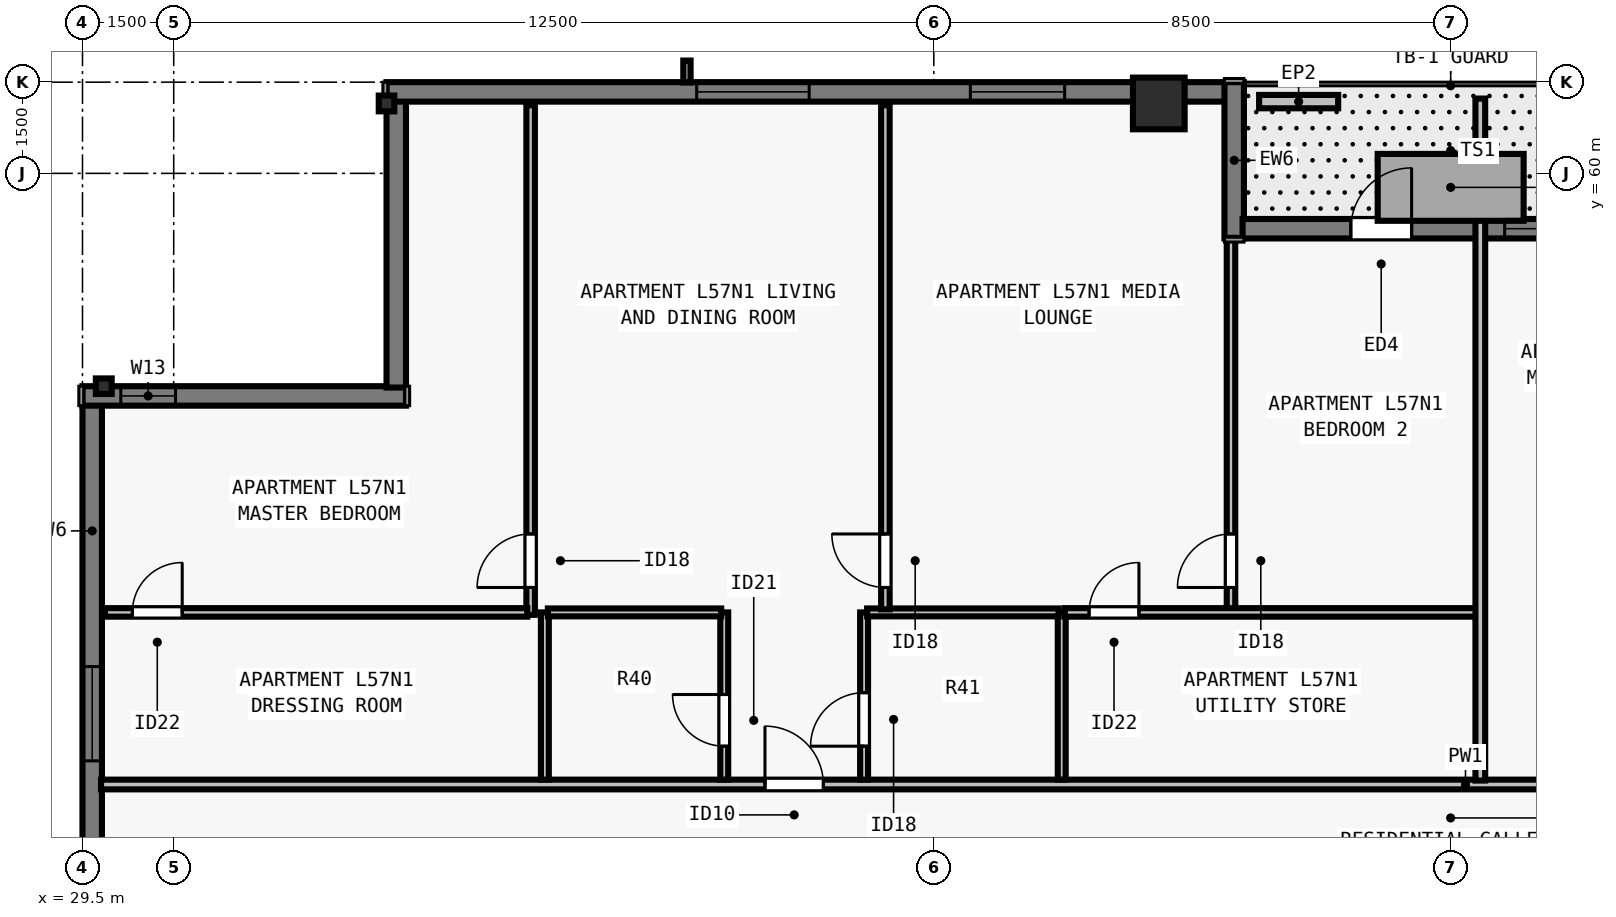
"""IFC4 building model, lengths in metres.
Left out: names, types, materials, properties, quantities, classifications, styles, units other than length and angle.
Written with IfcOpenShell. Run it as: python <this file> out.ifc"""

import sys

from ifc_helpers import new_model, si_unit, direction, frame, frame_2d, origin, origin_2d, place, context, subcontext, project, spatial, rectangle, i_section, extrude, element, fill, save


model = new_model("IFC4")
c1 = context("Model", 3, precision=1e-05, world=origin(), true_north=direction((0.0, 1.0)))
c2 = subcontext(c1, "Body", "Model", "MODEL_VIEW")
j1 = project(units=[si_unit("LENGTHUNIT", "METRE"), si_unit("PLANEANGLEUNIT", "RADIAN")], contexts=[c1])
p1 = place(None, origin())
s1 = spatial("IfcSite", under=j1, at=p1, CompositionType="ELEMENT")
p2 = place(p1, origin())
s2 = spatial("IfcBuilding", under=s1, at=p2, CompositionType="ELEMENT")
p3 = place(p2, frame((0.0, 0.0, 209.5)))
s3 = spatial("IfcBuildingStorey", under=s2, at=p3, CompositionType="ELEMENT", Elevation=209.5)
p4 = place(p3, frame((47.2, 61.15, 0.0), z_axis=(0.0, 0.0, 1.0), x_axis=(1.0, 0.0, 0.0)))
e1 = element("IfcColumn", 1, at=p4, inside=s3, PredefinedType="COLUMN", context=c2, shape_type="SweptSolid", body=[
    extrude(rectangle(XDim=0.85, YDim=0.85, at=origin_2d()), origin(), (0.0, 0.0, 1.0), 3.5),
])
for number, where, z_axis, x_axis in (
    (2, (34.5, 61.15, 0.0), (0.0, 0.0, 1.0), (1.0, 0.0, 0.0)),
    (3, (29.85, 56.5, 0.0), (0.0, 0.0, 1.0), (0.0, 1.0, 0.0)),
):
    element("IfcColumn", number, at=place(p3, frame(where, z_axis=z_axis, x_axis=x_axis)), inside=s3, PredefinedType="COLUMN", context=c2, shape_type="SweptSolid", body=[
        extrude(i_section(OverallWidth=0.256, OverallDepth=0.26, WebThickness=0.01, FlangeThickness=0.017, FilletRadius=0.013, at=origin_2d()), origin(), (0.0, 0.0, 1.0), 3.5),
    ])
p5 = place(p3, frame((29.66, 21.5, 0.0), z_axis=(0.0, 0.0, 1.0), x_axis=(0.0, 1.0, 0.0)))
e4 = element("IfcWall", 4, at=p5, inside=s3, PredefinedType="SOLIDWALL", context=c2, shape_type="SweptSolid", body=[
    extrude(rectangle(XDim=34.702, YDim=0.32, at=frame_2d((17.351, 0.0))), origin(), (0.0, 0.0, 1.0), 3.29),
])
p6 = place(p5, frame((4.163, 0.0, 0.8)))
e5 = element("IfcOpeningElement", 5, at=p6, cuts=e4, PredefinedType="OPENING", context=c2, shape_type="SweptSolid", body=[
    extrude(rectangle(XDim=1.85, YDim=1.678, at=frame_2d((0.925, 0.839))), frame((0.0, 0.17, 0.0), z_axis=(0.0, -1.0, 0.0), x_axis=(1.0, 0.0, 0.0)), (0.0, 0.0, 1.0), 0.34),
])
p7 = place(p5, frame((6.888, 0.0, 0.8)))
e6 = element("IfcOpeningElement", 6, at=p7, cuts=e4, PredefinedType="OPENING", context=c2, shape_type="SweptSolid", body=[
    extrude(rectangle(XDim=1.55, YDim=1.678, at=frame_2d((0.775, 0.839))), frame((0.0, 0.17, 0.0), z_axis=(0.0, -1.0, 0.0), x_axis=(1.0, 0.0, 0.0)), (0.0, 0.0, 1.0), 0.34),
])
p8 = place(p5, frame((10.113, 0.0, 0.8)))
e7 = element("IfcOpeningElement", 7, at=p8, cuts=e4, PredefinedType="OPENING", context=c2, shape_type="SweptSolid", body=[
    extrude(rectangle(XDim=1.85, YDim=1.678, at=frame_2d((0.925, 0.839))), frame((0.0, 0.17, 0.0), z_axis=(0.0, -1.0, 0.0), x_axis=(1.0, 0.0, 0.0)), (0.0, 0.0, 1.0), 0.34),
])
p9 = place(p5, frame((14.888, 0.0, 0.8)))
e8 = element("IfcOpeningElement", 8, at=p9, cuts=e4, PredefinedType="OPENING", context=c2, shape_type="SweptSolid", body=[
    extrude(rectangle(XDim=1.55, YDim=1.678, at=frame_2d((0.775, 0.839))), frame((0.0, 0.17, 0.0), z_axis=(0.0, -1.0, 0.0), x_axis=(1.0, 0.0, 0.0)), (0.0, 0.0, 1.0), 0.34),
])
p10 = place(p5, frame((19.364, 0.0, 0.8)))
e9 = element("IfcOpeningElement", 9, at=p10, cuts=e4, PredefinedType="OPENING", context=c2, shape_type="SweptSolid", body=[
    extrude(rectangle(XDim=1.85, YDim=1.678, at=frame_2d((0.925, 0.839))), frame((0.0, 0.17, 0.0), z_axis=(0.0, -1.0, 0.0), x_axis=(1.0, 0.0, 0.0)), (0.0, 0.0, 1.0), 0.34),
])
p11 = place(p5, frame((23.614, 0.0, 0.8)))
e10 = element("IfcOpeningElement", 10, at=p11, cuts=e4, PredefinedType="OPENING", context=c2, shape_type="SweptSolid", body=[
    extrude(rectangle(XDim=1.85, YDim=1.678, at=frame_2d((0.925, 0.839))), frame((0.0, 0.17, 0.0), z_axis=(0.0, -1.0, 0.0), x_axis=(1.0, 0.0, 0.0)), (0.0, 0.0, 1.0), 0.34),
])
p12 = place(p5, frame((28.839, 0.0, 0.8)))
e11 = element("IfcOpeningElement", 11, at=p12, cuts=e4, PredefinedType="OPENING", context=c2, shape_type="SweptSolid", body=[
    extrude(rectangle(XDim=1.55, YDim=1.678, at=frame_2d((0.775, 0.839))), frame((0.0, 0.17, 0.0), z_axis=(0.0, -1.0, 0.0), x_axis=(1.0, 0.0, 0.0)), (0.0, 0.0, 1.0), 0.34),
])
p13 = place(p3, frame((29.5, 56.34, 0.0), z_axis=(0.0, 0.0, 1.0), x_axis=(1.0, 0.0, 0.0)))
e12 = element("IfcWall", 12, at=p13, inside=s3, PredefinedType="SOLIDWALL", context=c2, shape_type="SweptSolid", body=[
    extrude(rectangle(XDim=5.32, YDim=0.32, at=frame_2d((2.66, 0.0))), origin(), (0.0, 0.0, 1.0), 3.29),
])
p14 = place(p13, frame((0.63, 0.0, 0.8)))
e13 = element("IfcOpeningElement", 13, at=p14, cuts=e12, PredefinedType="OPENING", context=c2, shape_type="SweptSolid", body=[
    extrude(rectangle(XDim=0.9, YDim=1.678, at=frame_2d((0.45, 0.839))), frame((0.0, 0.17, 0.0), z_axis=(0.0, -1.0, 0.0), x_axis=(1.0, 0.0, 0.0)), (0.0, 0.0, 1.0), 0.34),
])
p15 = place(p3, frame((34.66, 56.478, 0.0), z_axis=(0.0, 0.0, 1.0), x_axis=(0.0, 1.0, 0.0)))
e14 = element("IfcWall", 14, at=p15, inside=s3, PredefinedType="SOLIDWALL", context=c2, shape_type="SweptSolid", body=[
    extrude(rectangle(XDim=4.724, YDim=0.32, at=frame_2d((2.362, 0.0))), origin(), (0.0, 0.0, 1.0), 3.29),
])
p16 = place(p3, frame((34.5, 61.34, 0.0), z_axis=(0.0, 0.0, 1.0), x_axis=(1.0, 0.0, 0.0)))
e15 = element("IfcWall", 15, at=p16, inside=s3, PredefinedType="SOLIDWALL", context=c2, shape_type="SweptSolid", body=[
    extrude(rectangle(XDim=13.802, YDim=0.32, at=frame_2d((6.901, 0.0))), origin(), (0.0, 0.0, 1.0), 3.29),
])
p17 = place(p16, frame((5.101, 0.0, 0.8)))
e16 = element("IfcOpeningElement", 16, at=p17, cuts=e15, PredefinedType="OPENING", context=c2, shape_type="SweptSolid", body=[
    extrude(rectangle(XDim=1.85, YDim=1.678, at=frame_2d((0.925, 0.839))), frame((0.0, 0.17, 0.0), z_axis=(0.0, -1.0, 0.0), x_axis=(1.0, 0.0, 0.0)), (0.0, 0.0, 1.0), 0.34),
])
p18 = place(p16, frame((9.602, 0.0, 0.8)))
e17 = element("IfcOpeningElement", 17, at=p18, cuts=e15, PredefinedType="OPENING", context=c2, shape_type="SweptSolid", body=[
    extrude(rectangle(XDim=1.55, YDim=1.678, at=frame_2d((0.775, 0.839))), frame((0.0, 0.17, 0.0), z_axis=(0.0, -1.0, 0.0), x_axis=(1.0, 0.0, 0.0)), (0.0, 0.0, 1.0), 0.34),
])
p19 = place(p3, frame((48.44, 61.5, 0.0), z_axis=(0.0, 0.0, 1.0), x_axis=(0.0, -1.0, 0.0)))
e18 = element("IfcWall", 18, at=p19, inside=s3, PredefinedType="SOLIDWALL", context=c2, shape_type="SweptSolid", body=[
    extrude(rectangle(XDim=2.57, YDim=0.32, at=frame_2d((1.285, 0.0))), origin(), (0.0, 0.0, 1.0), 3.29),
])
p20 = place(p3, frame((48.578, 59.09, 0.0), z_axis=(0.0, 0.0, 1.0), x_axis=(1.0, 0.0, 0.0)))
e19 = element("IfcWall", 19, at=p20, inside=s3, PredefinedType="SOLIDWALL", context=c2, shape_type="SweptSolid", body=[
    extrude(rectangle(XDim=7.142, YDim=0.32, at=frame_2d((3.571, 0.0))), origin(), (0.0, 0.0, 1.0), 3.29),
])
p21 = place(p20, frame((1.78, 0.0, 0.0)))
e20 = element("IfcOpeningElement", 20, at=p21, cuts=e19, PredefinedType="OPENING", context=c2, shape_type="SweptSolid", body=[
    extrude(rectangle(XDim=1.0, YDim=2.15, at=frame_2d((0.5, 1.075))), frame((0.0, 0.17, 0.0), z_axis=(0.0, -1.0, 0.0), x_axis=(1.0, 0.0, 0.0)), (0.0, 0.0, 1.0), 0.34),
])
p22 = place(p20, frame((4.31, 0.0, 0.8)))
e21 = element("IfcOpeningElement", 21, at=p22, cuts=e19, PredefinedType="OPENING", context=c2, shape_type="SweptSolid", body=[
    extrude(rectangle(XDim=0.9, YDim=1.678, at=frame_2d((0.45, 0.839))), frame((0.0, 0.17, 0.0), z_axis=(0.0, -1.0, 0.0), x_axis=(1.0, 0.0, 0.0)), (0.0, 0.0, 1.0), 0.34),
])
p23 = place(p3, frame((48.85, 61.18, 0.0), z_axis=(0.0, 0.0, 1.0), x_axis=(1.0, 0.0, 0.0)))
e22 = element("IfcWall", 22, at=p23, inside=s3, PredefinedType="PARAPET", context=c2, shape_type="SweptSolid", body=[
    extrude(rectangle(XDim=1.3, YDim=0.22, at=frame_2d((0.65, 0.0))), origin(), (0.0, 0.0, 1.0), 0.55),
])
p24 = place(p3, frame((29.805, 49.95, 0.0), z_axis=(0.0, 0.0, 1.0), x_axis=(1.0, 0.0, 0.0)))
e23 = element("IfcWall", 23, at=p24, inside=s3, PredefinedType="PARTITIONING", context=c2, shape_type="SweptSolid", body=[
    extrude(rectangle(XDim=44.39, YDim=0.16, at=frame_2d((22.195, 0.0))), origin(), (0.0, 0.0, 1.0), 2.958),
])
p25 = place(p24, frame((10.919, 0.0, 0.0)))
e24 = element("IfcOpeningElement", 24, at=p25, cuts=e23, PredefinedType="OPENING", context=c2, shape_type="SweptSolid", body=[
    extrude(rectangle(XDim=0.96, YDim=2.18, at=frame_2d((0.48, 1.09))), frame((0.0, 0.09, 0.0), z_axis=(0.0, -1.0, 0.0), x_axis=(1.0, 0.0, 0.0)), (0.0, 0.0, 1.0), 0.18),
])
p26 = place(p24, frame((32.999, 0.0, 0.0)))
e25 = element("IfcOpeningElement", 25, at=p26, cuts=e23, PredefinedType="OPENING", context=c2, shape_type="SweptSolid", body=[
    extrude(rectangle(XDim=0.96, YDim=2.18, at=frame_2d((0.48, 1.09))), frame((0.0, 0.09, 0.0), z_axis=(0.0, -1.0, 0.0), x_axis=(1.0, 0.0, 0.0)), (0.0, 0.0, 1.0), 0.18),
])
p27 = place(p3, frame((37.104, 50.03, 0.0), z_axis=(0.0, 0.0, 1.0), x_axis=(0.0, 1.0, 0.0)))
e26 = element("IfcWall", 26, at=p27, inside=s3, PredefinedType="PLUMBINGWALL", context=c2, shape_type="SweptSolid", body=[
    extrude(rectangle(XDim=2.75, YDim=0.13, at=frame_2d((1.375, 0.0))), origin(), (0.0, 0.0, 1.0), 3.29),
])
p28 = place(p3, frame((40.054, 50.03, 0.0), z_axis=(0.0, 0.0, 1.0), x_axis=(0.0, 1.0, 0.0)))
e27 = element("IfcWall", 27, at=p28, inside=s3, PredefinedType="PLUMBINGWALL", context=c2, shape_type="SweptSolid", body=[
    extrude(rectangle(XDim=2.75, YDim=0.13, at=frame_2d((1.375, 0.0))), origin(), (0.0, 0.0, 1.0), 2.573),
])
p29 = place(p28, frame((0.55, 0.0, 0.0)))
e28 = element("IfcOpeningElement", 28, at=p29, cuts=e27, PredefinedType="OPENING", context=c2, shape_type="SweptSolid", body=[
    extrude(rectangle(XDim=0.85, YDim=2.08, at=frame_2d((0.425, 1.04))), frame((0.0, 0.075, 0.0), z_axis=(0.0, -1.0, 0.0), x_axis=(1.0, 0.0, 0.0)), (0.0, 0.0, 1.0), 0.15),
])
p30 = place(p3, frame((37.154, 52.78, 0.0), z_axis=(0.0, 0.0, 1.0), x_axis=(1.0, 0.0, 0.0)))
e29 = element("IfcWall", 29, at=p30, inside=s3, PredefinedType="PLUMBINGWALL", context=c2, shape_type="SweptSolid", body=[
    extrude(rectangle(XDim=2.85, YDim=0.13, at=frame_2d((1.425, 0.0))), origin(), (0.0, 0.0, 1.0), 3.29),
])
p31 = place(p3, frame((45.604, 50.03, 0.0), z_axis=(0.0, 0.0, 1.0), x_axis=(0.0, 1.0, 0.0)))
e30 = element("IfcWall", 30, at=p31, inside=s3, PredefinedType="PLUMBINGWALL", context=c2, shape_type="SweptSolid", body=[
    extrude(rectangle(XDim=2.75, YDim=0.13, at=frame_2d((1.375, 0.0))), origin(), (0.0, 0.0, 1.0), 3.29),
])
p32 = place(p3, frame((42.354, 50.03, 0.0), z_axis=(0.0, 0.0, 1.0), x_axis=(0.0, 1.0, 0.0)))
e31 = element("IfcWall", 31, at=p32, inside=s3, PredefinedType="PLUMBINGWALL", context=c2, shape_type="SweptSolid", body=[
    extrude(rectangle(XDim=2.75, YDim=0.13, at=frame_2d((1.375, 0.0))), origin(), (0.0, 0.0, 1.0), 3.29),
])
p33 = place(p32, frame((0.55, 0.0, 0.0)))
e32 = element("IfcOpeningElement", 32, at=p33, cuts=e31, PredefinedType="OPENING", context=c2, shape_type="SweptSolid", body=[
    extrude(rectangle(XDim=0.88, YDim=2.1, at=frame_2d((0.44, 1.05))), frame((0.0, 0.075, 0.0), z_axis=(0.0, -1.0, 0.0), x_axis=(1.0, 0.0, 0.0)), (0.0, 0.0, 1.0), 0.15),
])
p34 = place(p3, frame((42.404, 52.78, 0.0), z_axis=(0.0, 0.0, 1.0), x_axis=(1.0, 0.0, 0.0)))
e33 = element("IfcWall", 33, at=p34, inside=s3, PredefinedType="PLUMBINGWALL", context=c2, shape_type="SweptSolid", body=[
    extrude(rectangle(XDim=3.15, YDim=0.13, at=frame_2d((1.575, 0.0))), origin(), (0.0, 0.0, 1.0), 3.29),
])
p35 = place(p3, frame((36.87, 52.74, 0.0), z_axis=(0.0, 0.0, 1.0), x_axis=(0.0, 1.0, 0.0)))
e34 = element("IfcWall", 34, at=p35, inside=s3, PredefinedType="PARTITIONING", context=c2, shape_type="SweptSolid", body=[
    extrude(rectangle(XDim=8.38, YDim=0.14, at=frame_2d((4.19, 0.0))), origin(), (0.0, 0.0, 1.0), 2.573),
])
p36 = place(p35, frame((0.45, 0.0, 0.0)))
e35 = element("IfcOpeningElement", 35, at=p36, cuts=e34, PredefinedType="OPENING", context=c2, shape_type="SweptSolid", body=[
    extrude(rectangle(XDim=0.88, YDim=2.1, at=frame_2d((0.44, 1.05))), frame((0.0, 0.08, 0.0), z_axis=(0.0, -1.0, 0.0), x_axis=(1.0, 0.0, 0.0)), (0.0, 0.0, 1.0), 0.16),
])
p37 = place(p3, frame((29.87, 52.78, 0.0), z_axis=(0.0, 0.0, 1.0), x_axis=(1.0, 0.0, 0.0)))
e36 = element("IfcWall", 36, at=p37, inside=s3, PredefinedType="PARTITIONING", context=c2, shape_type="SweptSolid", body=[
    extrude(rectangle(XDim=6.945, YDim=0.14, at=frame_2d((3.472, 0.0))), origin(), (0.0, 0.0, 1.0), 2.958),
])
p38 = place(p37, frame((0.45, 0.0, 0.0)))
e37 = element("IfcOpeningElement", 37, at=p38, cuts=e36, PredefinedType="OPENING", context=c2, shape_type="SweptSolid", body=[
    extrude(rectangle(XDim=0.82, YDim=2.1, at=frame_2d((0.41, 1.05))), frame((0.0, 0.08, 0.0), z_axis=(0.0, -1.0, 0.0), x_axis=(1.0, 0.0, 0.0)), (0.0, 0.0, 1.0), 0.16),
])
p39 = place(p3, frame((48.387, 52.74, 0.0), z_axis=(0.0, 0.0, 1.0), x_axis=(0.0, 1.0, 0.0)))
e38 = element("IfcWall", 38, at=p39, inside=s3, PredefinedType="PARTITIONING", context=c2, shape_type="SweptSolid", body=[
    extrude(rectangle(XDim=6.2, YDim=0.14, at=frame_2d((3.1, 0.0))), origin(), (0.0, 0.0, 1.0), 3.29),
])
p40 = place(p39, frame((0.45, 0.0, 0.0)))
e39 = element("IfcOpeningElement", 39, at=p40, cuts=e38, PredefinedType="OPENING", context=c2, shape_type="SweptSolid", body=[
    extrude(rectangle(XDim=0.88, YDim=2.1, at=frame_2d((0.44, 1.05))), frame((0.0, 0.08, 0.0), z_axis=(0.0, -1.0, 0.0), x_axis=(1.0, 0.0, 0.0)), (0.0, 0.0, 1.0), 0.16),
])
p41 = place(p3, frame((45.654, 52.78, 0.0), z_axis=(0.0, 0.0, 1.0), x_axis=(1.0, 0.0, 0.0)))
e40 = element("IfcWall", 40, at=p41, inside=s3, PredefinedType="PARTITIONING", context=c2, shape_type="SweptSolid", body=[
    extrude(rectangle(XDim=6.884, YDim=0.14, at=frame_2d((3.442, 0.0))), origin(), (0.0, 0.0, 1.0), 3.29),
])
p42 = place(p41, frame((0.4, 0.0, 0.0)))
e41 = element("IfcOpeningElement", 41, at=p42, cuts=e40, PredefinedType="OPENING", context=c2, shape_type="SweptSolid", body=[
    extrude(rectangle(XDim=0.82, YDim=2.1, at=frame_2d((0.41, 1.05))), frame((0.0, 0.08, 0.0), z_axis=(0.0, -1.0, 0.0), x_axis=(1.0, 0.0, 0.0)), (0.0, 0.0, 1.0), 0.16),
])
p43 = place(p3, frame((42.704, 52.83, 0.0), z_axis=(0.0, 0.0, 1.0), x_axis=(0.0, 1.0, 0.0)))
e42 = element("IfcWall", 42, at=p43, inside=s3, PredefinedType="PARTITIONING", context=c2, shape_type="SweptSolid", body=[
    extrude(rectangle(XDim=8.29, YDim=0.14, at=frame_2d((4.145, 0.0))), origin(), (0.0, 0.0, 1.0), 3.29),
])
p44 = place(p43, frame((0.36, 0.0, 0.0)))
e43 = element("IfcOpeningElement", 43, at=p44, cuts=e42, PredefinedType="OPENING", context=c2, shape_type="SweptSolid", body=[
    extrude(rectangle(XDim=0.88, YDim=2.1, at=frame_2d((0.44, 1.05))), frame((0.0, 0.08, 0.0), z_axis=(0.0, -1.0, 0.0), x_axis=(1.0, 0.0, 0.0)), (0.0, 0.0, 1.0), 0.16),
])
p45 = place(p3, frame((52.488, 50.015, 0.0), z_axis=(0.0, 0.0, 1.0), x_axis=(0.0, 1.0, 0.0)))
e44 = element("IfcWall", 44, at=p45, inside=s3, PredefinedType="PARTITIONING", context=c2, shape_type="SweptSolid", body=[
    extrude(rectangle(XDim=11.215, YDim=0.16, at=frame_2d((5.607, 0.0))), origin(), (0.0, 0.0, 1.0), 2.958),
])
p46 = place(p12, origin())
e45 = element("IfcWindow", 45, at=p46, inside=s3, PartitioningType="SINGLE_PANEL", PredefinedType="WINDOW", context=c2, shape_type="SweptSolid", body=[
    extrude(rectangle(XDim=1.55, YDim=1.678, at=frame_2d((0.775, 0.839))), frame((0.0, -0.05, 0.0), z_axis=(0.0, -1.0, 0.0), x_axis=(1.0, 0.0, 0.0)), (0.0, 0.0, 1.0), 0.06),
])
fill(e11, e45)
p47 = place(p17, origin())
e46 = element("IfcWindow", 46, at=p47, inside=s3, PartitioningType="SINGLE_PANEL", PredefinedType="WINDOW", context=c2, shape_type="SweptSolid", body=[
    extrude(rectangle(XDim=1.85, YDim=1.678, at=frame_2d((0.925, 0.839))), frame((0.0, -0.05, 0.0), z_axis=(0.0, -1.0, 0.0), x_axis=(1.0, 0.0, 0.0)), (0.0, 0.0, 1.0), 0.06),
])
fill(e16, e46)
p48 = place(p18, origin())
e47 = element("IfcWindow", 47, at=p48, inside=s3, PartitioningType="SINGLE_PANEL", PredefinedType="WINDOW", context=c2, shape_type="SweptSolid", body=[
    extrude(rectangle(XDim=1.55, YDim=1.678, at=frame_2d((0.775, 0.839))), frame((0.0, -0.05, 0.0), z_axis=(0.0, -1.0, 0.0), x_axis=(1.0, 0.0, 0.0)), (0.0, 0.0, 1.0), 0.06),
])
fill(e17, e47)
p49 = place(p21, origin())
e48 = element("IfcDoor", 48, at=p49, inside=s3, OperationType="SINGLE_SWING_RIGHT", PredefinedType="DOOR", context=c2, shape_type="SweptSolid", body=[
    extrude(rectangle(XDim=1.0, YDim=2.15, at=frame_2d((0.5, 1.075))), frame((0.0, 0.025, 0.0), z_axis=(0.0, -1.0, 0.0), x_axis=(1.0, 0.0, 0.0)), (0.0, 0.0, 1.0), 0.05),
])
fill(e20, e48)
p50 = place(p14, origin())
e49 = element("IfcWindow", 49, at=p50, inside=s3, PartitioningType="SINGLE_PANEL", PredefinedType="WINDOW", context=c2, shape_type="SweptSolid", body=[
    extrude(rectangle(XDim=0.9, YDim=1.678, at=frame_2d((0.45, 0.839))), frame((0.0, -0.04, 0.0), z_axis=(0.0, -1.0, 0.0), x_axis=(1.0, 0.0, 0.0)), (0.0, 0.0, 1.0), 0.06),
])
fill(e13, e49)
p51 = place(p22, origin())
e50 = element("IfcWindow", 50, at=p51, inside=s3, PartitioningType="SINGLE_PANEL", PredefinedType="WINDOW", context=c2, shape_type="SweptSolid", body=[
    extrude(rectangle(XDim=0.9, YDim=1.678, at=frame_2d((0.45, 0.839))), frame((0.0, -0.04, 0.0), z_axis=(0.0, -1.0, 0.0), x_axis=(1.0, 0.0, 0.0)), (0.0, 0.0, 1.0), 0.06),
])
fill(e21, e50)
p52 = place(p29, origin())
e51 = element("IfcDoor", 51, at=p52, inside=s3, OperationType="SINGLE_SWING_RIGHT", PredefinedType="DOOR", context=c2, shape_type="SweptSolid", body=[
    extrude(rectangle(XDim=0.85, YDim=2.08, at=frame_2d((0.425, 1.04))), frame((0.0, 0.025, 0.0), z_axis=(0.0, -1.0, 0.0), x_axis=(1.0, 0.0, 0.0)), (0.0, 0.0, 1.0), 0.05),
])
fill(e28, e51)
p53 = place(p33, origin())
e52 = element("IfcDoor", 52, at=p53, inside=s3, OperationType="SINGLE_SWING_LEFT", PredefinedType="DOOR", context=c2, shape_type="SweptSolid", body=[
    extrude(rectangle(XDim=0.88, YDim=2.1, at=frame_2d((0.44, 1.05))), frame((0.0, 0.025, 0.0), z_axis=(0.0, -1.0, 0.0), x_axis=(1.0, 0.0, 0.0)), (0.0, 0.0, 1.0), 0.05),
])
fill(e32, e52)
p54 = place(p38, origin())
e53 = element("IfcDoor", 53, at=p54, inside=s3, OperationType="SINGLE_SWING_RIGHT", PredefinedType="DOOR", context=c2, shape_type="SweptSolid", body=[
    extrude(rectangle(XDim=0.82, YDim=2.1, at=frame_2d((0.41, 1.05))), frame((0.0, 0.025, 0.0), z_axis=(0.0, -1.0, 0.0), x_axis=(1.0, 0.0, 0.0)), (0.0, 0.0, 1.0), 0.05),
])
fill(e37, e53)
p55 = place(p36, origin())
e54 = element("IfcDoor", 54, at=p55, inside=s3, OperationType="SINGLE_SWING_LEFT", PredefinedType="DOOR", context=c2, shape_type="SweptSolid", body=[
    extrude(rectangle(XDim=0.88, YDim=2.1, at=frame_2d((0.44, 1.05))), frame((0.0, 0.025, 0.0), z_axis=(0.0, -1.0, 0.0), x_axis=(1.0, 0.0, 0.0)), (0.0, 0.0, 1.0), 0.05),
])
fill(e35, e54)
p56 = place(p42, origin())
e55 = element("IfcDoor", 55, at=p56, inside=s3, OperationType="SINGLE_SWING_RIGHT", PredefinedType="DOOR", context=c2, shape_type="SweptSolid", body=[
    extrude(rectangle(XDim=0.82, YDim=2.1, at=frame_2d((0.41, 1.05))), frame((0.0, 0.025, 0.0), z_axis=(0.0, -1.0, 0.0), x_axis=(1.0, 0.0, 0.0)), (0.0, 0.0, 1.0), 0.05),
])
fill(e41, e55)
p57 = place(p40, origin())
e56 = element("IfcDoor", 56, at=p57, inside=s3, OperationType="SINGLE_SWING_LEFT", PredefinedType="DOOR", context=c2, shape_type="SweptSolid", body=[
    extrude(rectangle(XDim=0.88, YDim=2.1, at=frame_2d((0.44, 1.05))), frame((0.0, 0.025, 0.0), z_axis=(0.0, -1.0, 0.0), x_axis=(1.0, 0.0, 0.0)), (0.0, 0.0, 1.0), 0.05),
])
fill(e39, e56)
p58 = place(p44, origin())
e57 = element("IfcDoor", 57, at=p58, inside=s3, OperationType="SINGLE_SWING_RIGHT", PredefinedType="DOOR", context=c2, shape_type="SweptSolid", body=[
    extrude(rectangle(XDim=0.88, YDim=2.1, at=frame_2d((0.44, 1.05))), frame((0.0, 0.025, 0.0), z_axis=(0.0, -1.0, 0.0), x_axis=(1.0, 0.0, 0.0)), (0.0, 0.0, 1.0), 0.05),
])
fill(e43, e57)
p59 = place(p25, origin())
e58 = element("IfcDoor", 58, at=p59, inside=s3, OperationType="SINGLE_SWING_LEFT", PredefinedType="DOOR", context=c2, shape_type="SweptSolid", body=[
    extrude(rectangle(XDim=0.96, YDim=2.18, at=frame_2d((0.48, 1.09))), frame((0.0, 0.025, 0.0), z_axis=(0.0, -1.0, 0.0), x_axis=(1.0, 0.0, 0.0)), (0.0, 0.0, 1.0), 0.05),
])
fill(e24, e58)
save(model, sys.argv[1])
